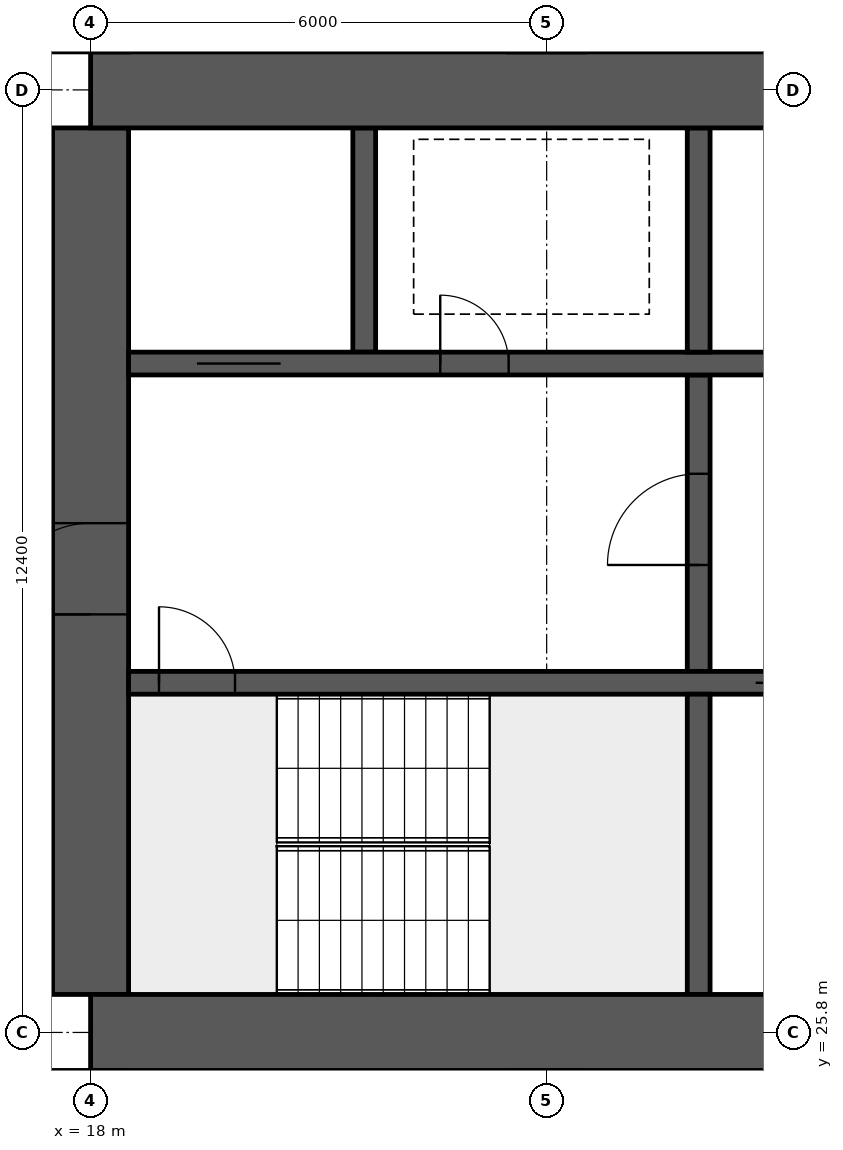
"""IFC4 building model, lengths in metres.
Left out: names, types, materials, properties, quantities, classifications, styles, units other than length and angle.
Written with IfcOpenShell. Run it as: python <this file> out.ifc"""

import sys

from ifc_helpers import new_model, si_unit, direction, frame, frame_2d, origin, place, context, subcontext, project, spatial, rectangle, extrude, element, fill, save


model = new_model("IFC4")
c1 = context("Model", 3, precision=1e-05, world=origin(), true_north=direction((0.0, 1.0)))
c2 = subcontext(c1, "Body", "Model", "MODEL_VIEW")
j1 = project(units=[si_unit("LENGTHUNIT", "METRE"), si_unit("PLANEANGLEUNIT", "RADIAN")], contexts=[c1])
p1 = place(None, origin())
s1 = spatial("IfcSite", under=j1, at=p1, CompositionType="ELEMENT")
p2 = place(p1, origin())
s2 = spatial("IfcBuilding", under=s1, at=p2, CompositionType="ELEMENT")
p3 = place(p2, frame((0.0, 0.0, 53.95)))
s3 = spatial("IfcBuildingStorey", under=s2, at=p3, CompositionType="ELEMENT", Elevation=53.95)
for number, where, z_axis, x_axis in (
    (1, (18.0, 25.8, 0.0), (0.0, 0.0, 1.0), (1.0, 0.0, 0.0)),
    (2, (18.0, 38.2, 0.0), (0.0, 0.0, 1.0), (1.0, 0.0, 0.0)),
):
    element("IfcWall", number, at=place(p3, frame(where, z_axis=z_axis, x_axis=x_axis)), inside=s3, PredefinedType="SHEAR", context=c2, shape_type="SweptSolid", body=[
        extrude(rectangle(XDim=48.0, YDim=1.0, at=frame_2d((24.0, 0.0))), origin(), (0.0, 0.0, 1.0), 3.75),
    ])
p4 = place(p3, frame((18.0, 26.3, 0.0), z_axis=(0.0, 0.0, 1.0), x_axis=(0.0, 1.0, 0.0)))
e3 = element("IfcWall", 3, at=p4, inside=s3, PredefinedType="SHEAR", context=c2, shape_type="SweptSolid", body=[
    extrude(rectangle(XDim=11.4, YDim=1.0, at=frame_2d((5.7, 0.0))), origin(), (0.0, 0.0, 1.0), 3.75),
])
p5 = place(p4, frame((5.0, 0.0, 0.0)))
e4 = element("IfcOpeningElement", 4, at=p5, cuts=e3, PredefinedType="OPENING", context=c2, shape_type="SweptSolid", body=[
    extrude(rectangle(XDim=1.2, YDim=2.1, at=frame_2d((0.6, 1.05))), frame((0.0, 0.51, 0.0), z_axis=(0.0, -1.0, 0.0), x_axis=(1.0, 0.0, 0.0)), (0.0, 0.0, 1.0), 1.02),
])
p6 = place(p3, frame((18.5, 30.4, 0.0), z_axis=(0.0, 0.0, 1.0), x_axis=(1.0, 0.0, 0.0)))
e5 = element("IfcWall", 5, at=p6, inside=s3, PredefinedType="SHEAR", context=c2, shape_type="SweptSolid", body=[
    extrude(rectangle(XDim=47.0, YDim=0.3, at=frame_2d((23.5, 0.0))), origin(), (0.0, 0.0, 1.0), 3.75),
])
p7 = place(p6, frame((0.4, 0.0, 0.0)))
e6 = element("IfcOpeningElement", 6, at=p7, cuts=e5, PredefinedType="OPENING", context=c2, shape_type="SweptSolid", body=[
    extrude(rectangle(XDim=1.0, YDim=2.1, at=frame_2d((0.5, 1.05))), frame((0.0, 0.16, 0.0), z_axis=(0.0, -1.0, 0.0), x_axis=(1.0, 0.0, 0.0)), (0.0, 0.0, 1.0), 0.32),
])
p8 = place(p6, frame((45.6, 0.0, 0.0)))
e7 = element("IfcOpeningElement", 7, at=p8, cuts=e5, PredefinedType="OPENING", context=c2, shape_type="SweptSolid", body=[
    extrude(rectangle(XDim=1.0, YDim=2.1, at=frame_2d((0.5, 1.05))), frame((0.0, 0.16, 0.0), z_axis=(0.0, -1.0, 0.0), x_axis=(1.0, 0.0, 0.0)), (0.0, 0.0, 1.0), 0.32),
])
p9 = place(p6, frame((8.25, 0.0, 0.0)))
e8 = element("IfcOpeningElement", 8, at=p9, cuts=e5, PredefinedType="OPENING", context=c2, shape_type="SweptSolid", body=[
    extrude(rectangle(XDim=1.1, YDim=2.1, at=frame_2d((0.55, 1.05))), frame((0.0, 0.16, 0.0), z_axis=(0.0, -1.0, 0.0), x_axis=(1.0, 0.0, 0.0)), (0.0, 0.0, 1.0), 0.32),
])
p10 = place(p6, frame((10.85, 0.0, 0.0)))
e9 = element("IfcOpeningElement", 9, at=p10, cuts=e5, PredefinedType="OPENING", context=c2, shape_type="SweptSolid", body=[
    extrude(rectangle(XDim=1.1, YDim=2.1, at=frame_2d((0.55, 1.05))), frame((0.0, 0.16, 0.0), z_axis=(0.0, -1.0, 0.0), x_axis=(1.0, 0.0, 0.0)), (0.0, 0.0, 1.0), 0.32),
])
p11 = place(p6, frame((13.45, 0.0, 0.0)))
e10 = element("IfcOpeningElement", 10, at=p11, cuts=e5, PredefinedType="OPENING", context=c2, shape_type="SweptSolid", body=[
    extrude(rectangle(XDim=1.1, YDim=2.1, at=frame_2d((0.55, 1.05))), frame((0.0, 0.16, 0.0), z_axis=(0.0, -1.0, 0.0), x_axis=(1.0, 0.0, 0.0)), (0.0, 0.0, 1.0), 0.32),
])
p12 = place(p6, frame((16.05, 0.0, 0.0)))
e11 = element("IfcOpeningElement", 11, at=p12, cuts=e5, PredefinedType="OPENING", context=c2, shape_type="SweptSolid", body=[
    extrude(rectangle(XDim=1.1, YDim=2.1, at=frame_2d((0.55, 1.05))), frame((0.0, 0.16, 0.0), z_axis=(0.0, -1.0, 0.0), x_axis=(1.0, 0.0, 0.0)), (0.0, 0.0, 1.0), 0.32),
])
p13 = place(p6, frame((30.117, 0.0, 0.0)))
e12 = element("IfcOpeningElement", 12, at=p13, cuts=e5, PredefinedType="OPENING", context=c2, shape_type="SweptSolid", body=[
    extrude(rectangle(XDim=1.1, YDim=2.1, at=frame_2d((0.55, 1.05))), frame((0.0, 0.16, 0.0), z_axis=(0.0, -1.0, 0.0), x_axis=(1.0, 0.0, 0.0)), (0.0, 0.0, 1.0), 0.32),
])
p14 = place(p6, frame((33.65, 0.0, 0.0)))
e13 = element("IfcOpeningElement", 13, at=p14, cuts=e5, PredefinedType="OPENING", context=c2, shape_type="SweptSolid", body=[
    extrude(rectangle(XDim=1.1, YDim=2.1, at=frame_2d((0.55, 1.05))), frame((0.0, 0.16, 0.0), z_axis=(0.0, -1.0, 0.0), x_axis=(1.0, 0.0, 0.0)), (0.0, 0.0, 1.0), 0.32),
])
p15 = place(p6, frame((37.183, 0.0, 0.0)))
e14 = element("IfcOpeningElement", 14, at=p15, cuts=e5, PredefinedType="OPENING", context=c2, shape_type="SweptSolid", body=[
    extrude(rectangle(XDim=1.1, YDim=2.1, at=frame_2d((0.55, 1.05))), frame((0.0, 0.16, 0.0), z_axis=(0.0, -1.0, 0.0), x_axis=(1.0, 0.0, 0.0)), (0.0, 0.0, 1.0), 0.32),
])
p16 = place(p3, frame((18.5, 34.6, 0.0), z_axis=(0.0, 0.0, 1.0), x_axis=(1.0, 0.0, 0.0)))
e15 = element("IfcWall", 15, at=p16, inside=s3, PredefinedType="SHEAR", context=c2, shape_type="SweptSolid", body=[
    extrude(rectangle(XDim=47.0, YDim=0.3, at=frame_2d((23.5, 0.0))), origin(), (0.0, 0.0, 1.0), 3.75),
])
p17 = place(p16, frame((0.9, 0.0, 0.0)))
e16 = element("IfcOpeningElement", 16, at=p17, cuts=e15, PredefinedType="OPENING", context=c2, shape_type="SweptSolid", body=[
    extrude(rectangle(XDim=1.1, YDim=2.1, at=frame_2d((0.55, 1.05))), frame((0.0, 0.16, 0.0), z_axis=(0.0, -1.0, 0.0), x_axis=(1.0, 0.0, 0.0)), (0.0, 0.0, 1.0), 0.32),
])
p18 = place(p16, frame((45.0, 0.0, 0.0)))
e17 = element("IfcOpeningElement", 17, at=p18, cuts=e15, PredefinedType="OPENING", context=c2, shape_type="SweptSolid", body=[
    extrude(rectangle(XDim=1.1, YDim=2.1, at=frame_2d((0.55, 1.05))), frame((0.0, 0.16, 0.0), z_axis=(0.0, -1.0, 0.0), x_axis=(1.0, 0.0, 0.0)), (0.0, 0.0, 1.0), 0.32),
])
p19 = place(p16, frame((4.1, 0.0, 0.0)))
e18 = element("IfcOpeningElement", 18, at=p19, cuts=e15, PredefinedType="OPENING", context=c2, shape_type="SweptSolid", body=[
    extrude(rectangle(XDim=0.9, YDim=2.1, at=frame_2d((0.45, 1.05))), frame((0.0, 0.16, 0.0), z_axis=(0.0, -1.0, 0.0), x_axis=(1.0, 0.0, 0.0)), (0.0, 0.0, 1.0), 0.32),
])
p20 = place(p16, frame((42.0, 0.0, 0.0)))
e19 = element("IfcOpeningElement", 19, at=p20, cuts=e15, PredefinedType="OPENING", context=c2, shape_type="SweptSolid", body=[
    extrude(rectangle(XDim=0.9, YDim=2.1, at=frame_2d((0.45, 1.05))), frame((0.0, 0.16, 0.0), z_axis=(0.0, -1.0, 0.0), x_axis=(1.0, 0.0, 0.0)), (0.0, 0.0, 1.0), 0.32),
])
p21 = place(p16, frame((8.875, 0.0, 0.0)))
e20 = element("IfcOpeningElement", 20, at=p21, cuts=e15, PredefinedType="OPENING", context=c2, shape_type="SweptSolid", body=[
    extrude(rectangle(XDim=0.9, YDim=2.1, at=frame_2d((0.45, 1.05))), frame((0.0, 0.16, 0.0), z_axis=(0.0, -1.0, 0.0), x_axis=(1.0, 0.0, 0.0)), (0.0, 0.0, 1.0), 0.32),
])
p22 = place(p16, frame((12.849, 0.0, 0.0)))
e21 = element("IfcOpeningElement", 21, at=p22, cuts=e15, PredefinedType="OPENING", context=c2, shape_type="SweptSolid", body=[
    extrude(rectangle(XDim=0.9, YDim=2.1, at=frame_2d((0.45, 1.05))), frame((0.0, 0.16, 0.0), z_axis=(0.0, -1.0, 0.0), x_axis=(1.0, 0.0, 0.0)), (0.0, 0.0, 1.0), 0.32),
])
p23 = place(p16, frame((16.496, 0.0, 0.0)))
e22 = element("IfcOpeningElement", 22, at=p23, cuts=e15, PredefinedType="OPENING", context=c2, shape_type="SweptSolid", body=[
    extrude(rectangle(XDim=0.9, YDim=2.1, at=frame_2d((0.45, 1.05))), frame((0.0, 0.16, 0.0), z_axis=(0.0, -1.0, 0.0), x_axis=(1.0, 0.0, 0.0)), (0.0, 0.0, 1.0), 0.32),
])
p24 = place(p16, frame((20.255, 0.0, 0.0)))
e23 = element("IfcOpeningElement", 23, at=p24, cuts=e15, PredefinedType="OPENING", context=c2, shape_type="SweptSolid", body=[
    extrude(rectangle(XDim=0.9, YDim=2.1, at=frame_2d((0.45, 1.05))), frame((0.0, 0.16, 0.0), z_axis=(0.0, -1.0, 0.0), x_axis=(1.0, 0.0, 0.0)), (0.0, 0.0, 1.0), 0.32),
])
p25 = place(p16, frame((24.661, 0.0, 0.0)))
e24 = element("IfcOpeningElement", 24, at=p25, cuts=e15, PredefinedType="OPENING", context=c2, shape_type="SweptSolid", body=[
    extrude(rectangle(XDim=0.9, YDim=2.1, at=frame_2d((0.45, 1.05))), frame((0.0, 0.16, 0.0), z_axis=(0.0, -1.0, 0.0), x_axis=(1.0, 0.0, 0.0)), (0.0, 0.0, 1.0), 0.32),
])
p26 = place(p16, frame((27.458, 0.0, 0.0)))
e25 = element("IfcOpeningElement", 25, at=p26, cuts=e15, PredefinedType="OPENING", context=c2, shape_type="SweptSolid", body=[
    extrude(rectangle(XDim=0.9, YDim=2.1, at=frame_2d((0.45, 1.05))), frame((0.0, 0.16, 0.0), z_axis=(0.0, -1.0, 0.0), x_axis=(1.0, 0.0, 0.0)), (0.0, 0.0, 1.0), 0.32),
])
p27 = place(p16, frame((29.628, 0.0, 0.0)))
e26 = element("IfcOpeningElement", 26, at=p27, cuts=e15, PredefinedType="OPENING", context=c2, shape_type="SweptSolid", body=[
    extrude(rectangle(XDim=0.9, YDim=2.1, at=frame_2d((0.45, 1.05))), frame((0.0, 0.16, 0.0), z_axis=(0.0, -1.0, 0.0), x_axis=(1.0, 0.0, 0.0)), (0.0, 0.0, 1.0), 0.32),
])
p28 = place(p16, frame((33.427, 0.0, 0.0)))
e27 = element("IfcOpeningElement", 27, at=p28, cuts=e15, PredefinedType="OPENING", context=c2, shape_type="SweptSolid", body=[
    extrude(rectangle(XDim=0.9, YDim=2.1, at=frame_2d((0.45, 1.05))), frame((0.0, 0.16, 0.0), z_axis=(0.0, -1.0, 0.0), x_axis=(1.0, 0.0, 0.0)), (0.0, 0.0, 1.0), 0.32),
])
p29 = place(p16, frame((37.378, 0.0, 0.0)))
e28 = element("IfcOpeningElement", 28, at=p29, cuts=e15, PredefinedType="OPENING", context=c2, shape_type="SweptSolid", body=[
    extrude(rectangle(XDim=0.9, YDim=2.1, at=frame_2d((0.45, 1.05))), frame((0.0, 0.16, 0.0), z_axis=(0.0, -1.0, 0.0), x_axis=(1.0, 0.0, 0.0)), (0.0, 0.0, 1.0), 0.32),
])
p30 = place(p3, frame((26.0, 26.3, 0.0), z_axis=(0.0, 0.0, 1.0), x_axis=(0.0, 1.0, 0.0)))
e29 = element("IfcWall", 29, at=p30, inside=s3, PredefinedType="SHEAR", context=c2, shape_type="SweptSolid", body=[
    extrude(rectangle(XDim=3.95, YDim=0.3, at=frame_2d((1.975, 0.0))), origin(), (0.0, 0.0, 1.0), 3.75),
])
p31 = place(p3, frame((26.0, 30.55, 0.0), z_axis=(0.0, 0.0, 1.0), x_axis=(0.0, 1.0, 0.0)))
e30 = element("IfcWall", 30, at=p31, inside=s3, PredefinedType="SHEAR", context=c2, shape_type="SweptSolid", body=[
    extrude(rectangle(XDim=3.9, YDim=0.3, at=frame_2d((1.95, 0.0))), origin(), (0.0, 0.0, 1.0), 3.75),
])
p32 = place(p31, frame((1.4, 0.0, 0.0)))
e31 = element("IfcOpeningElement", 31, at=p32, cuts=e30, PredefinedType="OPENING", context=c2, shape_type="SweptSolid", body=[
    extrude(rectangle(XDim=1.2, YDim=2.1, at=frame_2d((0.6, 1.05))), frame((0.0, 0.16, 0.0), z_axis=(0.0, -1.0, 0.0), x_axis=(1.0, 0.0, 0.0)), (0.0, 0.0, 1.0), 0.32),
])
for number, where, z_axis, x_axis in (
    (32, (21.6, 34.75, 0.0), (0.0, 0.0, 1.0), (0.0, 1.0, 0.0)),
    (33, (26.0, 34.75, 0.0), (0.0, 0.0, 1.0), (0.0, 1.0, 0.0)),
):
    element("IfcWall", number, at=place(p3, frame(where, z_axis=z_axis, x_axis=x_axis)), inside=s3, PredefinedType="SHEAR", context=c2, shape_type="SweptSolid", body=[
        extrude(rectangle(XDim=2.95, YDim=0.3, at=frame_2d((1.475, 0.0))), origin(), (0.0, 0.0, 1.0), 3.75),
    ])
p33 = place(p5, origin())
e34 = element("IfcDoor", 34, at=p33, inside=s3, OperationType="SINGLE_SWING_LEFT", PredefinedType="DOOR", context=c2, shape_type="SweptSolid", body=[
    extrude(rectangle(XDim=1.2, YDim=2.1, at=frame_2d((0.6, 1.05))), frame((0.0, 0.025, 0.0), z_axis=(0.0, -1.0, 0.0), x_axis=(1.0, 0.0, 0.0)), (0.0, 0.0, 1.0), 0.05),
])
fill(e4, e34)
p34 = place(p7, origin())
e35 = element("IfcDoor", 35, at=p34, inside=s3, OperationType="SINGLE_SWING_LEFT", PredefinedType="DOOR", context=c2, shape_type="SweptSolid", body=[
    extrude(rectangle(XDim=1.0, YDim=2.1, at=frame_2d((0.5, 1.05))), frame((0.0, 0.025, 0.0), z_axis=(0.0, -1.0, 0.0), x_axis=(1.0, 0.0, 0.0)), (0.0, 0.0, 1.0), 0.05),
])
fill(e6, e35)
p35 = place(p17, origin())
e36 = element("IfcDoor", 36, at=p35, inside=s3, OperationType="DOUBLE_DOOR_SLIDING", PredefinedType="DOOR", context=c2, shape_type="SweptSolid", body=[
    extrude(rectangle(XDim=1.1, YDim=2.1, at=frame_2d((0.55, 1.05))), frame((0.0, 0.025, 0.0), z_axis=(0.0, -1.0, 0.0), x_axis=(1.0, 0.0, 0.0)), (0.0, 0.0, 1.0), 0.05),
])
fill(e16, e36)
p36 = place(p19, origin())
e37 = element("IfcDoor", 37, at=p36, inside=s3, OperationType="SINGLE_SWING_LEFT", PredefinedType="DOOR", context=c2, shape_type="SweptSolid", body=[
    extrude(rectangle(XDim=0.9, YDim=2.1, at=frame_2d((0.45, 1.05))), frame((0.0, 0.025, 0.0), z_axis=(0.0, -1.0, 0.0), x_axis=(1.0, 0.0, 0.0)), (0.0, 0.0, 1.0), 0.05),
])
fill(e18, e37)
p37 = place(p32, origin())
e38 = element("IfcDoor", 38, at=p37, inside=s3, OperationType="SINGLE_SWING_LEFT", PredefinedType="DOOR", context=c2, shape_type="SweptSolid", body=[
    extrude(rectangle(XDim=1.2, YDim=2.1, at=frame_2d((0.6, 1.05))), frame((0.0, 0.025, 0.0), z_axis=(0.0, -1.0, 0.0), x_axis=(1.0, 0.0, 0.0)), (0.0, 0.0, 1.0), 0.05),
])
fill(e31, e38)
p38 = place(p9, origin())
e39 = element("IfcDoor", 39, at=p38, inside=s3, OperationType="DOUBLE_DOOR_SLIDING", PredefinedType="DOOR", context=c2, shape_type="SweptSolid", body=[
    extrude(rectangle(XDim=1.1, YDim=2.1, at=frame_2d((0.55, 1.05))), frame((0.0, 0.025, 0.0), z_axis=(0.0, -1.0, 0.0), x_axis=(1.0, 0.0, 0.0)), (0.0, 0.0, 1.0), 0.05),
])
fill(e8, e39)
save(model, sys.argv[1])
